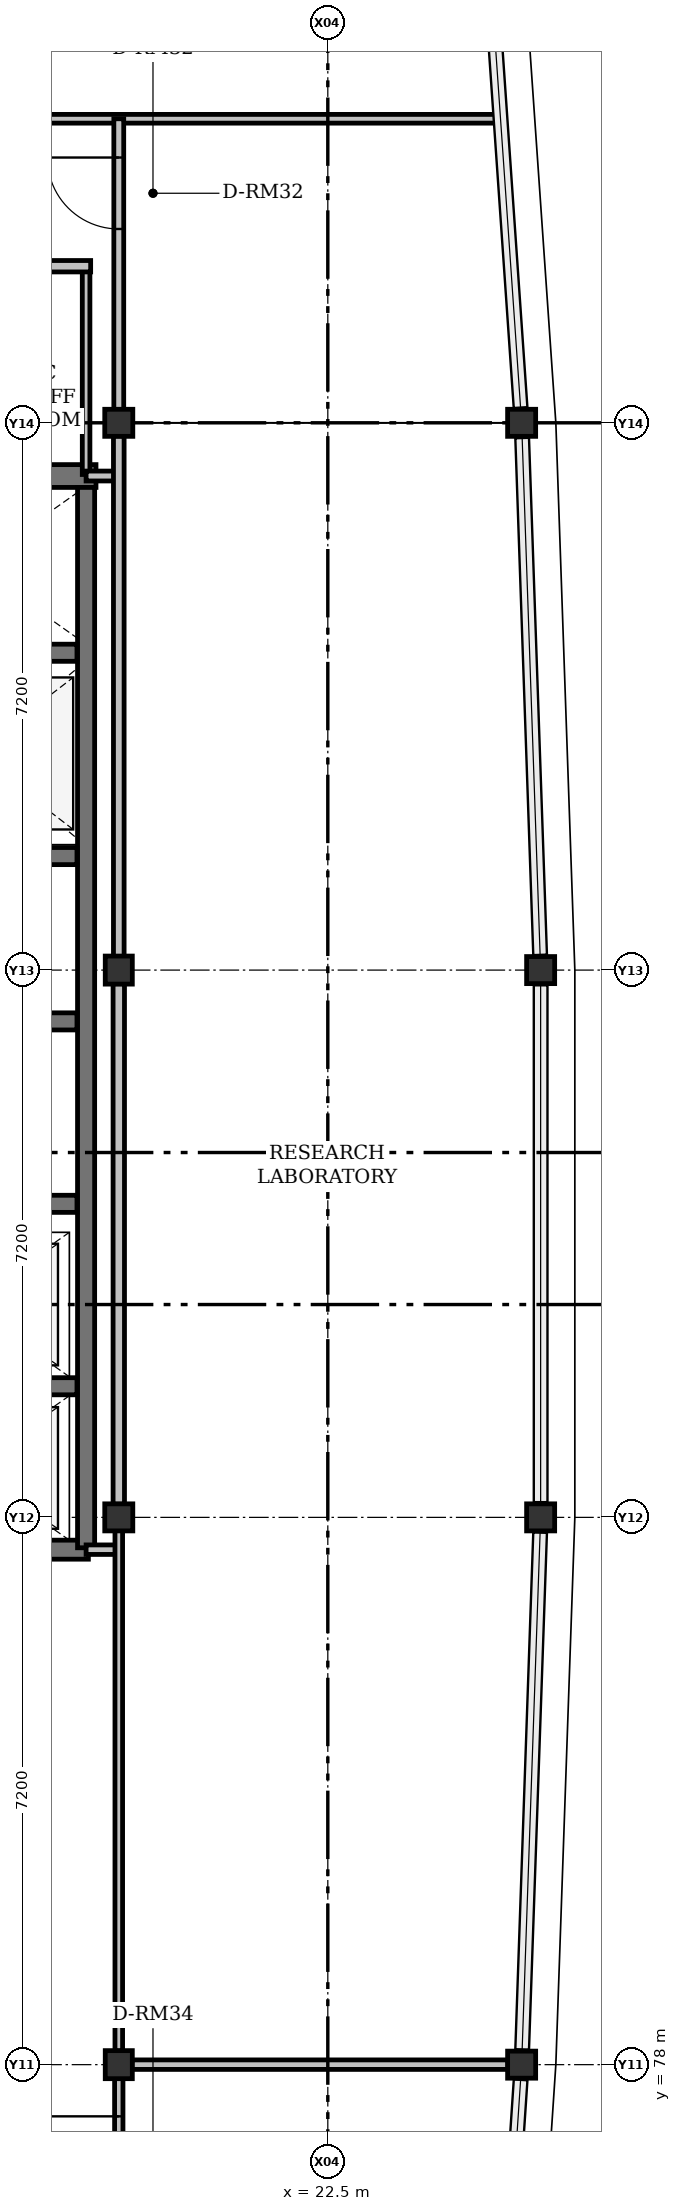
"""IFC4 building model, lengths in metres.
Left out: names, types, materials, properties, quantities, classifications, styles, units other than length and angle.
Written with IfcOpenShell. Run it as: python <this file> out.ifc"""

import sys

from ifc_helpers import new_model, si_unit, direction, frame, frame_2d, origin, origin_2d, place, context, subcontext, project, spatial, rectangle, i_section, extrude, element, fill, save


model = new_model("IFC4")
c1 = context("Model", 3, precision=1e-05, world=origin(), true_north=direction((0.0, 1.0)))
c2 = subcontext(c1, "Body", "Model", "MODEL_VIEW")
j1 = project(units=[si_unit("LENGTHUNIT", "METRE"), si_unit("PLANEANGLEUNIT", "RADIAN")], contexts=[c1])
p1 = place(None, origin())
s1 = spatial("IfcSite", under=j1, at=p1, CompositionType="ELEMENT")
p2 = place(p1, origin())
s2 = spatial("IfcBuilding", under=s1, at=p2, CompositionType="ELEMENT")
p3 = place(p2, frame((0.0, 0.0, 51.9)))
s3 = spatial("IfcBuildingStorey", under=s2, at=p3, CompositionType="ELEMENT", Elevation=51.9)
for number, where, z_axis, x_axis in (
    (1, (19.75, 78.0, 0.0), (0.0, 0.0, 1.0), (0.0, 1.0, 0.0)),
    (2, (25.05, 78.0, 0.0), (0.0, 0.0, 1.0), (1.0, 0.0, 0.0)),
    (3, (19.75, 85.2, 0.0), (0.0, 0.0, 1.0), (1.0, 0.0, 0.0)),
    (4, (25.3, 85.2, 0.0), (0.0, 0.0, 1.0), (1.0, 0.0, 0.0)),
    (5, (19.75, 92.4, 0.0), (0.0, 0.0, 1.0), (0.0, 1.0, 0.0)),
    (6, (25.3, 92.4, 0.0), (0.0, 0.0, 1.0), (1.0, 0.0, 0.0)),
    (7, (19.75, 99.6, 0.0), (0.0, 0.0, 1.0), (1.0, 0.0, 0.0)),
    (8, (25.05, 99.6, 0.0), (0.0, 0.0, 1.0), (1.0, 0.0, 0.0)),
):
    element("IfcColumn", number, at=place(p3, frame(where, z_axis=z_axis, x_axis=x_axis)), inside=s3, PredefinedType="COLUMN", context=c2, shape_type="SweptSolid", body=[
        extrude(i_section(OverallWidth=0.369, OverallDepth=0.356, WebThickness=0.011, FlangeThickness=0.018, FilletRadius=0.015, at=origin_2d()), origin(), (0.0, 0.0, 1.0), 4.2),
    ])
p4 = place(p3, frame((16.15, 98.9, 0.0), z_axis=(0.0, 0.0, 1.0), x_axis=(1.0, 0.0, 0.0)))
e9 = element("IfcWall", 9, at=p4, inside=s3, PredefinedType="SHEAR", context=c2, shape_type="SweptSolid", body=[
    extrude(rectangle(XDim=3.3, YDim=0.3, at=frame_2d((1.65, 0.0))), origin(), (0.0, 0.0, 1.0), 4.2),
])
p5 = place(p3, frame((16.4, 84.775, 0.0), z_axis=(0.0, 0.0, 1.0), x_axis=(1.0, 0.0, 0.0)))
e10 = element("IfcWall", 10, at=p5, inside=s3, PredefinedType="SHEAR", context=c2, shape_type="SweptSolid", body=[
    extrude(rectangle(XDim=2.95, YDim=0.25, at=frame_2d((1.475, 0.0))), origin(), (0.0, 0.0, 1.0), 4.2),
])
p6 = place(p3, frame((19.32, 84.8, 0.0), z_axis=(0.0, 0.0, 1.0), x_axis=(0.0, 1.0, 0.0)))
e11 = element("IfcWall", 11, at=p6, inside=s3, PredefinedType="SHEAR", context=c2, shape_type="SweptSolid", body=[
    extrude(rectangle(XDim=13.95, YDim=0.225, at=frame_2d((6.975, 0.0))), origin(), (0.0, 0.0, 1.0), 4.2),
])
for number, where, z_axis, x_axis in (
    (12, (16.4, 86.925, 0.0), (0.0, 0.0, 1.0), (1.0, 0.0, 0.0)),
    (13, (16.4, 89.325, 0.0), (0.0, 0.0, 1.0), (1.0, 0.0, 0.0)),
    (14, (16.4, 91.725, 0.0), (0.0, 0.0, 1.0), (1.0, 0.0, 0.0)),
    (15, (16.4, 93.9, 0.0), (0.0, 0.0, 1.0), (1.0, 0.0, 0.0)),
    (16, (16.4, 96.575, 0.0), (0.0, 0.0, 1.0), (1.0, 0.0, 0.0)),
):
    element("IfcWall", number, at=place(p3, frame(where, z_axis=z_axis, x_axis=x_axis)), inside=s3, PredefinedType="SHEAR", context=c2, shape_type="SweptSolid", body=[
        extrude(rectangle(XDim=2.8, YDim=0.225, at=frame_2d((1.4, 0.0))), origin(), (0.0, 0.0, 1.0), 4.2),
    ])
p7 = place(p3, frame((19.32, 98.92, 0.0), z_axis=(0.0, 0.0, 1.0), x_axis=(0.0, 1.0, 0.0)))
e17 = element("IfcWall", 17, at=p7, inside=s3, PredefinedType="PARTITIONING", context=c2, shape_type="SweptSolid", body=[
    extrude(rectangle(XDim=2.74, YDim=0.1, at=frame_2d((1.37, 0.0))), origin(), (0.0, 0.0, 1.0), 3.451),
])
p8 = place(p3, frame((19.38, 101.66, 0.0), z_axis=(0.0, 0.0, 1.0), x_axis=(-1.0, 0.0, 0.0)))
e18 = element("IfcWall", 18, at=p8, inside=s3, PredefinedType="PARTITIONING", context=c2, shape_type="SweptSolid", body=[
    extrude(rectangle(XDim=3.16, YDim=0.15, at=frame_2d((1.58, 0.0))), origin(), (0.0, 0.0, 1.0), 3.95),
])
p9 = place(p3, frame((19.75, 98.9, 0.0), z_axis=(0.0, 0.0, 1.0), x_axis=(-1.0, 0.0, 0.0)))
e19 = element("IfcWall", 19, at=p9, inside=s3, PredefinedType="PARTITIONING", context=c2, shape_type="SweptSolid", body=[
    extrude(rectangle(XDim=0.43, YDim=0.13, at=frame_2d((0.215, 0.0))), origin(), (0.0, 0.0, 1.0), 3.527),
])
p10 = place(p3, frame((19.32, 84.775, 0.0), z_axis=(0.0, 0.0, 1.0), x_axis=(1.0, 0.0, 0.0)))
e20 = element("IfcWall", 20, at=p10, inside=s3, PredefinedType="PARTITIONING", context=c2, shape_type="SweptSolid", body=[
    extrude(rectangle(XDim=0.43, YDim=0.125, at=frame_2d((0.215, 0.0))), origin(), (0.0, 0.0, 1.0), 3.527),
])
p11 = place(p3, frame((7.85, 103.6, 0.0), z_axis=(0.0, 0.0, 1.0), x_axis=(1.0, 0.0, 0.0)))
e21 = element("IfcWall", 21, at=p11, inside=s3, PredefinedType="PARTITIONING", context=c2, shape_type="SweptSolid", body=[
    extrude(rectangle(XDim=16.94, YDim=0.115, at=frame_2d((8.47, 0.0))), origin(), (0.0, 0.0, 1.0), 3.527),
])
p12 = place(p11, frame((2.3, 0.0, 0.0)))
e22 = element("IfcOpeningElement", 22, at=p12, cuts=e21, PredefinedType="OPENING", context=c2, shape_type="SweptSolid", body=[
    extrude(rectangle(XDim=0.9, YDim=2.08, at=frame_2d((0.45, 1.04))), frame((0.0, 0.058, 0.0), z_axis=(0.0, -1.0, 0.0), x_axis=(1.0, 0.0, 0.0)), (0.0, 0.0, 1.0), 0.115),
])
p13 = place(p11, frame((4.05, 0.0, 0.92)))
e23 = element("IfcOpeningElement", 23, at=p13, cuts=e21, PredefinedType="OPENING", context=c2, shape_type="SweptSolid", body=[
    extrude(rectangle(XDim=1.0, YDim=1.3, at=frame_2d((0.5, 0.65))), frame((0.0, 0.058, 0.0), z_axis=(0.0, -1.0, 0.0), x_axis=(1.0, 0.0, 0.0)), (0.0, 0.0, 1.0), 0.115),
])
p14 = place(p3, frame((19.75, 78.179, 0.0), z_axis=(0.0, 0.0, 1.0), x_axis=(0.0, 1.0, 0.0)))
e24 = element("IfcWall", 24, at=p14, inside=s3, PredefinedType="PARTITIONING", context=c2, shape_type="SweptSolid", body=[
    extrude(rectangle(XDim=6.848, YDim=0.1, at=frame_2d((3.424, 0.0))), origin(), (0.0, 0.0, 1.0), 3.527),
])
p15 = place(p3, frame((19.75, 85.373, 0.0), z_axis=(0.0, 0.0, 1.0), x_axis=(0.0, 1.0, 0.0)))
e25 = element("IfcWall", 25, at=p15, inside=s3, PredefinedType="PARTITIONING", context=c2, shape_type="SweptSolid", body=[
    extrude(rectangle(XDim=6.847, YDim=0.15, at=frame_2d((3.424, 0.0))), origin(), (0.0, 0.0, 1.0), 3.527),
])
p16 = place(p3, frame((19.75, 92.58, 0.0), z_axis=(0.0, 0.0, 1.0), x_axis=(0.0, 1.0, 0.0)))
e26 = element("IfcWall", 26, at=p16, inside=s3, PredefinedType="PARTITIONING", context=c2, shape_type="SweptSolid", body=[
    extrude(rectangle(XDim=6.847, YDim=0.14, at=frame_2d((3.424, 0.0))), origin(), (0.0, 0.0, 1.0), 3.527),
])
p17 = place(p3, frame((19.75, 99.773, 0.0), z_axis=(0.0, 0.0, 1.0), x_axis=(0.0, 1.0, 0.0)))
e27 = element("IfcWall", 27, at=p17, inside=s3, PredefinedType="PARTITIONING", context=c2, shape_type="SweptSolid", body=[
    extrude(rectangle(XDim=3.827, YDim=0.13, at=frame_2d((1.914, 0.0))), origin(), (0.0, 0.0, 1.0), 3.527),
])
p18 = place(p17, frame((2.377, 0.0, 0.0)))
e28 = element("IfcOpeningElement", 28, at=p18, cuts=e27, PredefinedType="OPENING", context=c2, shape_type="SweptSolid", body=[
    extrude(rectangle(XDim=0.94, YDim=2.08, at=frame_2d((0.47, 1.04))), frame((0.0, 0.065, 0.0), z_axis=(0.0, -1.0, 0.0), x_axis=(1.0, 0.0, 0.0)), (0.0, 0.0, 1.0), 0.13),
])
p19 = place(p3, frame((24.871, 78.0, 0.0), z_axis=(0.0, 0.0, 1.0), x_axis=(-1.0, 0.0, 0.0)))
e29 = element("IfcWall", 29, at=p19, inside=s3, PredefinedType="PARTITIONING", context=c2, shape_type="SweptSolid", body=[
    extrude(rectangle(XDim=4.948, YDim=0.125, at=frame_2d((2.474, 0.0))), origin(), (0.0, 0.0, 1.0), 3.451),
])
p20 = place(p3, frame((19.75, 70.673, 0.0), z_axis=(0.0, 0.0, 1.0), x_axis=(0.0, 1.0, 0.0)))
e30 = element("IfcWall", 30, at=p20, inside=s3, PredefinedType="PARTITIONING", context=c2, shape_type="SweptSolid", body=[
    extrude(rectangle(XDim=7.147, YDim=0.11, at=frame_2d((3.574, 0.0))), origin(), (0.0, 0.0, 1.0), 3.527),
])
p21 = place(p20, frame((5.507, 0.0, 0.0)))
e31 = element("IfcOpeningElement", 31, at=p21, cuts=e30, PredefinedType="OPENING", context=c2, shape_type="SweptSolid", body=[
    extrude(rectangle(XDim=1.14, YDim=2.18, at=frame_2d((0.57, 1.09))), frame((0.0, 0.055, 0.0), z_axis=(0.0, -1.0, 0.0), x_axis=(1.0, 0.0, 0.0)), (0.0, 0.0, 1.0), 0.11),
])
p22 = place(p18, origin())
e32 = element("IfcDoor", 32, at=p22, inside=s3, OperationType="SINGLE_SWING_RIGHT", PredefinedType="DOOR", context=c2, shape_type="SweptSolid", body=[
    extrude(rectangle(XDim=0.94, YDim=2.08, at=frame_2d((0.47, 1.04))), frame((0.0, 0.025, 0.0), z_axis=(0.0, -1.0, 0.0), x_axis=(1.0, 0.0, 0.0)), (0.0, 0.0, 1.0), 0.05),
])
fill(e28, e32)
p23 = place(p21, origin())
e33 = element("IfcDoor", 33, at=p23, inside=s3, OperationType="SINGLE_SWING_RIGHT", PredefinedType="DOOR", context=c2, shape_type="SweptSolid", body=[
    extrude(rectangle(XDim=1.14, YDim=2.18, at=frame_2d((0.57, 1.09))), frame((0.0, 0.025, 0.0), z_axis=(0.0, -1.0, 0.0), x_axis=(1.0, 0.0, 0.0)), (0.0, 0.0, 1.0), 0.05),
])
fill(e31, e33)
save(model, sys.argv[1])
